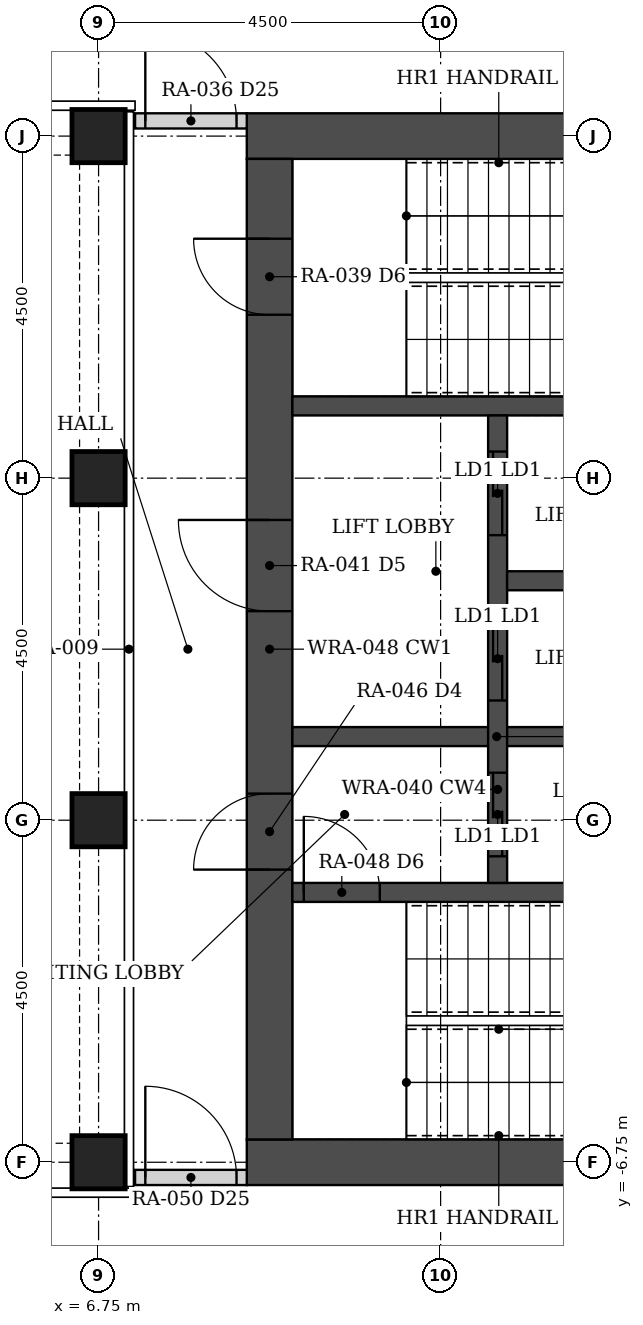
"""IFC4 building model, lengths in metres.
Left out: names, types, materials, properties, quantities, classifications, styles, units other than length and angle.
Written with IfcOpenShell. Run it as: python <this file> out.ifc"""

import sys

from ifc_helpers import new_model, si_unit, direction, frame, frame_2d, origin, origin_2d, place, context, subcontext, project, spatial, rectangle, hollow_rectangle, extrude, element, fill, save


model = new_model("IFC4")
c1 = context("Model", 3, precision=1e-05, world=origin(), true_north=direction((0.0, 1.0)))
c2 = subcontext(c1, "Body", "Model", "MODEL_VIEW")
j1 = project(units=[si_unit("LENGTHUNIT", "METRE"), si_unit("PLANEANGLEUNIT", "RADIAN")], contexts=[c1])
p1 = place(None, origin())
s1 = spatial("IfcSite", under=j1, at=p1, CompositionType="ELEMENT")
p2 = place(p1, origin())
s2 = spatial("IfcBuilding", under=s1, at=p2, CompositionType="ELEMENT")
p3 = place(p2, frame((0.0, 0.0, 30.0)))
s3 = spatial("IfcBuildingStorey", under=s2, at=p3, CompositionType="ELEMENT", Elevation=30.0)
for number, where, z_axis, x_axis in (
    (1, (6.75, -6.75, 0.0), (0.0, 0.0, 1.0), (1.0, 0.0, 0.0)),
    (2, (6.75, -2.25, 0.0), (0.0, 0.0, 1.0), (1.0, 0.0, 0.0)),
    (3, (6.75, 2.25, 0.0), (0.0, 0.0, 1.0), (1.0, 0.0, 0.0)),
    (4, (6.75, 6.75, 0.0), (0.0, 0.0, 1.0), (1.0, 0.0, 0.0)),
):
    element("IfcColumn", number, at=place(p3, frame(where, z_axis=z_axis, x_axis=x_axis)), inside=s3, PredefinedType="COLUMN", context=c2, shape_type="SweptSolid", body=[
        extrude(hollow_rectangle(XDim=0.7, YDim=0.7, WallThickness=0.07, at=origin_2d()), origin(), (0.0, 0.0, 1.0), 3.5),
    ])
for number, where, z_axis, x_axis in (
    (5, (8.7, -6.75, 0.0), (0.0, 0.0, 1.0), (1.0, 0.0, 0.0)),
    (6, (8.7, 6.75, 0.0), (0.0, 0.0, 1.0), (1.0, 0.0, 0.0)),
):
    element("IfcWall", number, at=place(p3, frame(where, z_axis=z_axis, x_axis=x_axis)), inside=s3, PredefinedType="SHEAR", context=c2, shape_type="SweptSolid", body=[
        extrude(rectangle(XDim=9.6, YDim=0.6, at=frame_2d((4.8, 0.0))), origin(), (0.0, 0.0, 1.0), 3.5),
    ])
p4 = place(p3, frame((9.0, -6.45, 0.0), z_axis=(0.0, 0.0, 1.0), x_axis=(0.0, 1.0, 0.0)))
e7 = element("IfcWall", 7, at=p4, inside=s3, PredefinedType="SHEAR", context=c2, shape_type="SweptSolid", body=[
    extrude(rectangle(XDim=12.9, YDim=0.6, at=frame_2d((6.45, 0.0))), origin(), (0.0, 0.0, 1.0), 3.5),
])
p5 = place(p4, frame((3.55, 0.0, 0.0)))
e8 = element("IfcOpeningElement", 8, at=p5, cuts=e7, PredefinedType="OPENING", context=c2, shape_type="SweptSolid", body=[
    extrude(rectangle(XDim=1.0, YDim=2.1, at=frame_2d((0.5, 1.05))), frame((0.0, 0.31, 0.0), z_axis=(0.0, -1.0, 0.0), x_axis=(1.0, 0.0, 0.0)), (0.0, 0.0, 1.0), 0.62),
])
p6 = place(p4, frame((6.95, 0.0, 0.0)))
e9 = element("IfcOpeningElement", 9, at=p6, cuts=e7, PredefinedType="OPENING", context=c2, shape_type="SweptSolid", body=[
    extrude(rectangle(XDim=1.2, YDim=2.1, at=frame_2d((0.6, 1.05))), frame((0.0, 0.31, 0.0), z_axis=(0.0, -1.0, 0.0), x_axis=(1.0, 0.0, 0.0)), (0.0, 0.0, 1.0), 0.62),
])
p7 = place(p4, frame((10.85, 0.0, 0.0)))
e10 = element("IfcOpeningElement", 10, at=p7, cuts=e7, PredefinedType="OPENING", context=c2, shape_type="SweptSolid", body=[
    extrude(rectangle(XDim=1.0, YDim=2.1, at=frame_2d((0.5, 1.05))), frame((0.0, 0.31, 0.0), z_axis=(0.0, -1.0, 0.0), x_axis=(1.0, 0.0, 0.0)), (0.0, 0.0, 1.0), 0.62),
])
p8 = place(p3, frame((9.3, -3.2, 0.0), z_axis=(0.0, 0.0, 1.0), x_axis=(1.0, 0.0, 0.0)))
e11 = element("IfcWall", 11, at=p8, inside=s3, PredefinedType="SHEAR", context=c2, shape_type="SweptSolid", body=[
    extrude(rectangle(XDim=8.4, YDim=0.25, at=frame_2d((4.2, 0.0))), origin(), (0.0, 0.0, 1.0), 3.5),
])
p9 = place(p8, frame((0.15, 0.0, 0.0)))
e12 = element("IfcOpeningElement", 12, at=p9, cuts=e11, PredefinedType="OPENING", context=c2, shape_type="SweptSolid", body=[
    extrude(rectangle(XDim=1.0, YDim=2.1, at=frame_2d((0.5, 1.05))), frame((0.0, 0.135, 0.0), z_axis=(0.0, -1.0, 0.0), x_axis=(1.0, 0.0, 0.0)), (0.0, 0.0, 1.0), 0.27),
])
p10 = place(p3, frame((9.3, 3.2, 0.0), z_axis=(0.0, 0.0, 1.0), x_axis=(1.0, 0.0, 0.0)))
e13 = element("IfcWall", 13, at=p10, inside=s3, PredefinedType="SHEAR", context=c2, shape_type="SweptSolid", body=[
    extrude(rectangle(XDim=8.4, YDim=0.25, at=frame_2d((4.2, 0.0))), origin(), (0.0, 0.0, 1.0), 3.5),
])
p11 = place(p3, frame((9.3, -1.15, 0.0), z_axis=(0.0, 0.0, 1.0), x_axis=(1.0, 0.0, 0.0)))
e14 = element("IfcWall", 14, at=p11, inside=s3, PredefinedType="SHEAR", context=c2, shape_type="SweptSolid", body=[
    extrude(rectangle(XDim=5.375, YDim=0.25, at=frame_2d((2.688, 0.0))), origin(), (0.0, 0.0, 1.0), 3.5),
])
p12 = place(p3, frame((12.0, -3.075, 0.0), z_axis=(0.0, 0.0, 1.0), x_axis=(0.0, 1.0, 0.0)))
e15 = element("IfcWall", 15, at=p12, inside=s3, PredefinedType="SHEAR", context=c2, shape_type="SweptSolid", body=[
    extrude(rectangle(XDim=6.15, YDim=0.25, at=frame_2d((3.075, 0.0))), origin(), (0.0, 0.0, 1.0), 3.5),
])
p13 = place(p12, frame((0.35, 0.0, 0.0)))
e16 = element("IfcOpeningElement", 16, at=p13, cuts=e15, PredefinedType="OPENING", context=c2, shape_type="SweptSolid", body=[
    extrude(rectangle(XDim=1.1, YDim=2.1, at=frame_2d((0.55, 1.05))), frame((0.0, 0.135, 0.0), z_axis=(0.0, -1.0, 0.0), x_axis=(1.0, 0.0, 0.0)), (0.0, 0.0, 1.0), 0.27),
])
p14 = place(p12, frame((2.4, 0.0, 0.0)))
e17 = element("IfcOpeningElement", 17, at=p14, cuts=e15, PredefinedType="OPENING", context=c2, shape_type="SweptSolid", body=[
    extrude(rectangle(XDim=1.1, YDim=2.1, at=frame_2d((0.55, 1.05))), frame((0.0, 0.135, 0.0), z_axis=(0.0, -1.0, 0.0), x_axis=(1.0, 0.0, 0.0)), (0.0, 0.0, 1.0), 0.27),
])
p15 = place(p12, frame((4.575, 0.0, 0.0)))
e18 = element("IfcOpeningElement", 18, at=p15, cuts=e15, PredefinedType="OPENING", context=c2, shape_type="SweptSolid", body=[
    extrude(rectangle(XDim=1.1, YDim=2.1, at=frame_2d((0.55, 1.05))), frame((0.0, 0.135, 0.0), z_axis=(0.0, -1.0, 0.0), x_axis=(1.0, 0.0, 0.0)), (0.0, 0.0, 1.0), 0.27),
])
p16 = place(p3, frame((12.125, 0.9, 0.0), z_axis=(0.0, 0.0, 1.0), x_axis=(1.0, 0.0, 0.0)))
e19 = element("IfcWall", 19, at=p16, inside=s3, PredefinedType="SHEAR", context=c2, shape_type="SweptSolid", body=[
    extrude(rectangle(XDim=2.55, YDim=0.25, at=frame_2d((1.275, 0.0))), origin(), (0.0, 0.0, 1.0), 3.5),
])
p17 = place(p3, frame((7.23, 6.95, 0.0), z_axis=(0.0, 0.0, 1.0), x_axis=(1.0, 0.0, 0.0)))
e20 = element("IfcWall", 20, at=p17, inside=s3, PredefinedType="PARTITIONING", context=c2, shape_type="SweptSolid", body=[
    extrude(rectangle(XDim=1.47, YDim=0.2, at=frame_2d((0.735, 0.0))), origin(), (0.0, 0.0, 1.0), 2.373),
])
p18 = place(p17, frame((0.135, 0.0, 0.0)))
e21 = element("IfcOpeningElement", 21, at=p18, cuts=e20, PredefinedType="OPENING", context=c2, shape_type="SweptSolid", body=[
    extrude(rectangle(XDim=1.2, YDim=2.1, at=frame_2d((0.6, 1.05))), frame((0.0, 0.11, 0.0), z_axis=(0.0, -1.0, 0.0), x_axis=(1.0, 0.0, 0.0)), (0.0, 0.0, 1.0), 0.22),
])
p19 = place(p3, frame((7.23, -6.95, 0.0), z_axis=(0.0, 0.0, 1.0), x_axis=(1.0, 0.0, 0.0)))
e22 = element("IfcWall", 22, at=p19, inside=s3, PredefinedType="PARTITIONING", context=c2, shape_type="SweptSolid", body=[
    extrude(rectangle(XDim=1.47, YDim=0.2, at=frame_2d((0.735, 0.0))), origin(), (0.0, 0.0, 1.0), 2.373),
])
p20 = place(p19, frame((0.135, 0.0, 0.0)))
e23 = element("IfcOpeningElement", 23, at=p20, cuts=e22, PredefinedType="OPENING", context=c2, shape_type="SweptSolid", body=[
    extrude(rectangle(XDim=1.2, YDim=2.1, at=frame_2d((0.6, 1.05))), frame((0.0, 0.11, 0.0), z_axis=(0.0, -1.0, 0.0), x_axis=(1.0, 0.0, 0.0)), (0.0, 0.0, 1.0), 0.22),
])
p21 = place(p18, origin())
e24 = element("IfcDoor", 24, at=p21, inside=s3, OperationType="DOUBLE_DOOR_DOUBLE_SWING", PredefinedType="DOOR", context=c2, shape_type="SweptSolid", body=[
    extrude(rectangle(XDim=1.2, YDim=2.1, at=frame_2d((0.6, 1.05))), frame((0.0, 0.025, 0.0), z_axis=(0.0, -1.0, 0.0), x_axis=(1.0, 0.0, 0.0)), (0.0, 0.0, 1.0), 0.05),
])
fill(e21, e24)
p22 = place(p20, origin())
e25 = element("IfcDoor", 25, at=p22, inside=s3, OperationType="DOUBLE_DOOR_DOUBLE_SWING", PredefinedType="DOOR", context=c2, shape_type="SweptSolid", body=[
    extrude(rectangle(XDim=1.2, YDim=2.1, at=frame_2d((0.6, 1.05))), frame((0.0, 0.025, 0.0), z_axis=(0.0, -1.0, 0.0), x_axis=(1.0, 0.0, 0.0)), (0.0, 0.0, 1.0), 0.05),
])
fill(e23, e25)
p23 = place(p5, origin())
e26 = element("IfcDoor", 26, at=p23, inside=s3, OperationType="SINGLE_SWING_LEFT", PredefinedType="DOOR", context=c2, shape_type="SweptSolid", body=[
    extrude(rectangle(XDim=1.0, YDim=2.1, at=frame_2d((0.5, 1.05))), frame((0.0, 0.025, 0.0), z_axis=(0.0, -1.0, 0.0), x_axis=(1.0, 0.0, 0.0)), (0.0, 0.0, 1.0), 0.05),
])
fill(e8, e26)
p24 = place(p9, origin())
e27 = element("IfcDoor", 27, at=p24, inside=s3, OperationType="SINGLE_SWING_LEFT", PredefinedType="DOOR", context=c2, shape_type="SweptSolid", body=[
    extrude(rectangle(XDim=1.0, YDim=2.1, at=frame_2d((0.5, 1.05))), frame((0.0, 0.025, 0.0), z_axis=(0.0, -1.0, 0.0), x_axis=(1.0, 0.0, 0.0)), (0.0, 0.0, 1.0), 0.05),
])
fill(e12, e27)
p25 = place(p6, origin())
e28 = element("IfcDoor", 28, at=p25, inside=s3, OperationType="SINGLE_SWING_RIGHT", PredefinedType="DOOR", context=c2, shape_type="SweptSolid", body=[
    extrude(rectangle(XDim=1.2, YDim=2.1, at=frame_2d((0.6, 1.05))), frame((0.0, 0.025, 0.0), z_axis=(0.0, -1.0, 0.0), x_axis=(1.0, 0.0, 0.0)), (0.0, 0.0, 1.0), 0.05),
])
fill(e9, e28)
p26 = place(p7, origin())
e29 = element("IfcDoor", 29, at=p26, inside=s3, OperationType="SINGLE_SWING_RIGHT", PredefinedType="DOOR", context=c2, shape_type="SweptSolid", body=[
    extrude(rectangle(XDim=1.0, YDim=2.1, at=frame_2d((0.5, 1.05))), frame((0.0, 0.025, 0.0), z_axis=(0.0, -1.0, 0.0), x_axis=(1.0, 0.0, 0.0)), (0.0, 0.0, 1.0), 0.05),
])
fill(e10, e29)
p27 = place(p13, origin())
e30 = element("IfcDoor", 30, at=p27, inside=s3, OperationType="DOUBLE_DOOR_SLIDING", PredefinedType="DOOR", context=c2, shape_type="SweptSolid", body=[
    extrude(rectangle(XDim=1.1, YDim=2.1, at=frame_2d((0.55, 1.05))), frame((0.0, 0.025, 0.0), z_axis=(0.0, -1.0, 0.0), x_axis=(1.0, 0.0, 0.0)), (0.0, 0.0, 1.0), 0.05),
])
fill(e16, e30)
p28 = place(p14, origin())
e31 = element("IfcDoor", 31, at=p28, inside=s3, OperationType="DOUBLE_DOOR_SLIDING", PredefinedType="DOOR", context=c2, shape_type="SweptSolid", body=[
    extrude(rectangle(XDim=1.1, YDim=2.1, at=frame_2d((0.55, 1.05))), frame((0.0, 0.025, 0.0), z_axis=(0.0, -1.0, 0.0), x_axis=(1.0, 0.0, 0.0)), (0.0, 0.0, 1.0), 0.05),
])
fill(e17, e31)
p29 = place(p15, origin())
e32 = element("IfcDoor", 32, at=p29, inside=s3, OperationType="DOUBLE_DOOR_SLIDING", PredefinedType="DOOR", context=c2, shape_type="SweptSolid", body=[
    extrude(rectangle(XDim=1.1, YDim=2.1, at=frame_2d((0.55, 1.05))), frame((0.0, 0.025, 0.0), z_axis=(0.0, -1.0, 0.0), x_axis=(1.0, 0.0, 0.0)), (0.0, 0.0, 1.0), 0.05),
])
fill(e18, e32)
save(model, sys.argv[1])
